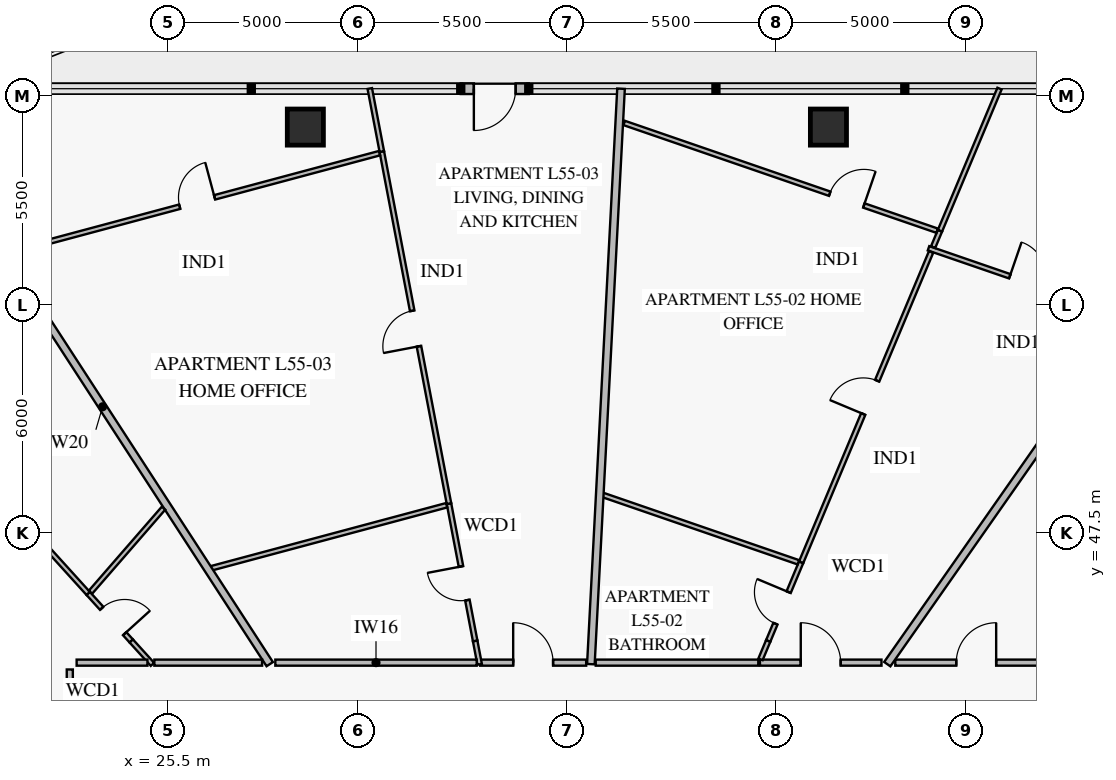
"""IFC4 building model, lengths in metres.
Left out: names, types, materials, properties, quantities, classifications, styles, units other than length and angle.
Written with IfcOpenShell. Run it as: python <this file> out.ifc"""

import sys

from ifc_helpers import new_model, si_unit, direction, frame, frame_2d, origin, origin_2d, place, context, subcontext, project, spatial, rectangle, extrude, element, fill, save


model = new_model("IFC4")
c1 = context("Model", 3, precision=1e-05, world=origin(), true_north=direction((0.0, 1.0)))
c2 = subcontext(c1, "Body", "Model", "MODEL_VIEW")
j1 = project(units=[si_unit("LENGTHUNIT", "METRE"), si_unit("PLANEANGLEUNIT", "RADIAN")], contexts=[c1])
p1 = place(None, origin())
s1 = spatial("IfcSite", under=j1, at=p1, CompositionType="ELEMENT")
p2 = place(p1, origin())
s2 = spatial("IfcBuilding", under=s1, at=p2, CompositionType="ELEMENT")
p3 = place(p2, frame((0.0, 0.0, 218.8)))
s3 = spatial("IfcBuildingStorey", under=s2, at=p3, CompositionType="ELEMENT", Elevation=218.8)
for number, where, z_axis, x_axis in (
    (1, (42.882, 58.173, 0.0), (0.0, 0.0, 1.0), (-1.0, 0.0, 0.0)),
    (2, (29.118, 58.173, 0.0), (0.0, 0.0, 1.0), (-1.0, 0.0, 0.0)),
):
    element("IfcColumn", number, at=place(p3, frame(where, z_axis=z_axis, x_axis=x_axis)), inside=s3, PredefinedType="COLUMN", context=c2, shape_type="SweptSolid", body=[
        extrude(rectangle(XDim=0.95, YDim=0.95, at=origin_2d()), origin(), (0.0, 0.0, 1.0), 3.55),
    ])
p4 = place(p3, frame((33.207, 59.183, 0.0), z_axis=(0.0, 0.0, 1.0), x_axis=(1.0, 0.0, 0.0)))
e3 = element("IfcWall", 3, at=p4, inside=s3, PredefinedType="SOLIDWALL", context=c2, shape_type="SweptSolid", body=[
    extrude(rectangle(XDim=1.79, YDim=0.28, at=frame_2d((0.895, 0.0))), origin(), (0.0, 0.0, 1.0), 3.55),
])
p5 = place(p4, frame((0.345, 0.0, 0.0)))
e4 = element("IfcOpeningElement", 4, at=p5, cuts=e3, PredefinedType="OPENING", context=c2, shape_type="SweptSolid", body=[
    extrude(rectangle(XDim=1.1, YDim=2.2, at=frame_2d((0.55, 1.1))), frame((0.0, 0.152, 0.0), z_axis=(0.0, -1.0, 0.0), x_axis=(1.0, 0.0, 0.0)), (0.0, 0.0, 1.0), 0.304),
])
p6 = place(p3, frame((48.9, 44.08, 0.0), z_axis=(0.0, 0.0, 1.0), x_axis=(-1.0, 0.0, 0.0)))
e5 = element("IfcWall", 5, at=p6, inside=s3, PredefinedType="PARTITIONING", context=c2, shape_type="SweptSolid", body=[
    extrude(rectangle(XDim=4.259, YDim=0.16, at=frame_2d((2.129, 0.0))), origin(), (0.0, 0.0, 1.0), 2.9),
])
p7 = place(p6, frame((1.604, 0.0, 0.0)))
e6 = element("IfcOpeningElement", 6, at=p7, cuts=e5, PredefinedType="OPENING", context=c2, shape_type="SweptSolid", body=[
    extrude(rectangle(XDim=1.05, YDim=2.15, at=frame_2d((0.525, 1.075))), frame((0.0, 0.092, 0.0), z_axis=(0.0, -1.0, 0.0), x_axis=(1.0, 0.0, 0.0)), (0.0, 0.0, 1.0), 0.184),
])
p8 = place(p3, frame((50.692, 53.201, 0.0), z_axis=(0.0, 0.0, 1.0), x_axis=(-0.945511260009, 0.325589399698, 0.0)))
e7 = element("IfcWall", 7, at=p8, inside=s3, PredefinedType="PARTITIONING", context=c2, shape_type="SweptSolid", body=[
    extrude(rectangle(XDim=5.475, YDim=0.12, at=frame_2d((2.738, 0.0))), origin(), (0.0, 0.0, 1.0), 3.55),
])
p9 = place(p8, frame((2.263, 0.0, 0.0)))
e8 = element("IfcOpeningElement", 8, at=p9, cuts=e7, PredefinedType="OPENING", context=c2, shape_type="SweptSolid", body=[
    extrude(rectangle(XDim=0.95, YDim=2.1, at=frame_2d((0.475, 1.05))), frame((0.0, 0.072, 0.0), z_axis=(0.0, -1.0, 0.0), x_axis=(1.0, 0.0, 0.0)), (0.0, 0.0, 1.0), 0.144),
])
p10 = place(p3, frame((41.297, 44.65, 0.0), z_axis=(0.0, 0.0, 1.0), x_axis=(0.386243492927, 0.922396858284, 0.0)))
e9 = element("IfcWall", 9, at=p10, inside=s3, PredefinedType="PARTITIONING", context=c2, shape_type="SweptSolid", body=[
    extrude(rectangle(XDim=2.246, YDim=0.12, at=frame_2d((1.123, 0.0))), origin(), (0.0, 0.0, 1.0), 3.55),
])
p11 = place(p10, frame((0.493, 0.0, 0.0)))
e10 = element("IfcOpeningElement", 10, at=p11, cuts=e9, PredefinedType="OPENING", context=c2, shape_type="SweptSolid", body=[
    extrude(rectangle(XDim=0.9, YDim=2.1, at=frame_2d((0.45, 1.05))), frame((0.0, 0.072, 0.0), z_axis=(0.0, -1.0, 0.0), x_axis=(1.0, 0.0, 0.0)), (0.0, 0.0, 1.0), 0.144),
])
p12 = place(p3, frame((42.164, 46.721, 0.0), z_axis=(0.0, 0.0, 1.0), x_axis=(0.386200840547, 0.922414717337, 0.0)))
e11 = element("IfcWall", 11, at=p12, inside=s3, PredefinedType="PARTITIONING", context=c2, shape_type="SweptSolid", body=[
    extrude(rectangle(XDim=8.854, YDim=0.12, at=frame_2d((4.427, 0.0))), origin(), (0.0, 0.0, 1.0), 3.55),
])
p13 = place(p12, frame((4.229, 0.0, 0.0)))
e12 = element("IfcOpeningElement", 12, at=p13, cuts=e11, PredefinedType="OPENING", context=c2, shape_type="SweptSolid", body=[
    extrude(rectangle(XDim=0.95, YDim=2.1, at=frame_2d((0.475, 1.05))), frame((0.0, 0.072, 0.0), z_axis=(0.0, -1.0, 0.0), x_axis=(1.0, 0.0, 0.0)), (0.0, 0.0, 1.0), 0.144),
])
p14 = place(p3, frame((45.636, 55.014, 0.0), z_axis=(0.0, 0.0, 1.0), x_axis=(0.38631298857, 0.922367754674, 0.0)))
e13 = element("IfcWall", 13, at=p14, inside=s3, PredefinedType="PARTITIONING", context=c2, shape_type="SweptSolid", body=[
    extrude(rectangle(XDim=0.469, YDim=0.12, at=frame_2d((0.235, 0.0))), origin(), (0.0, 0.0, 1.0), 3.55),
])
p15 = place(p3, frame((45.743, 55.446, 0.0), z_axis=(0.0, 0.0, 1.0), x_axis=(-0.945509015954, 0.325595916358, 0.0)))
e14 = element("IfcWall", 14, at=p15, inside=s3, PredefinedType="PARTITIONING", context=c2, shape_type="SweptSolid", body=[
    extrude(rectangle(XDim=8.711, YDim=0.12, at=frame_2d((4.355, 0.0))), origin(), (0.0, 0.0, 1.0), 2.87),
])
p16 = place(p15, frame((2.04, 0.0, 0.0)))
e15 = element("IfcOpeningElement", 15, at=p16, cuts=e14, PredefinedType="OPENING", context=c2, shape_type="SweptSolid", body=[
    extrude(rectangle(XDim=0.95, YDim=2.1, at=frame_2d((0.475, 1.05))), frame((0.0, 0.072, 0.0), z_axis=(0.0, -1.0, 0.0), x_axis=(1.0, 0.0, 0.0)), (0.0, 0.0, 1.0), 0.144),
])
p17 = place(p3, frame((44.278, 44.08, 0.0), z_axis=(0.0, 0.0, 1.0), x_axis=(-1.0, 0.0, 0.0)))
e16 = element("IfcWall", 16, at=p17, inside=s3, PredefinedType="PARTITIONING", context=c2, shape_type="SweptSolid", body=[
    extrude(rectangle(XDim=3.198, YDim=0.16, at=frame_2d((1.599, 0.0))), origin(), (0.0, 0.0, 1.0), 3.55),
])
p18 = place(p17, frame((1.074, 0.0, 0.0)))
e17 = element("IfcOpeningElement", 17, at=p18, cuts=e16, PredefinedType="OPENING", context=c2, shape_type="SweptSolid", body=[
    extrude(rectangle(XDim=1.05, YDim=2.15, at=frame_2d((0.525, 1.075))), frame((0.0, 0.092, 0.0), z_axis=(0.0, -1.0, 0.0), x_axis=(1.0, 0.0, 0.0)), (0.0, 0.0, 1.0), 0.184),
])
p19 = place(p3, frame((33.587, 44.65, 0.0), z_axis=(0.0, 0.0, 1.0), x_axis=(-0.187380416109, 0.982287422122, 0.0)))
e18 = element("IfcWall", 18, at=p19, inside=s3, PredefinedType="PARTITIONING", context=c2, shape_type="SweptSolid", body=[
    extrude(rectangle(XDim=3.679, YDim=0.12, at=frame_2d((1.84, 0.0))), origin(), (0.0, 0.0, 1.0), 3.55),
])
p20 = place(p19, frame((1.095, 0.0, 0.0)))
e19 = element("IfcOpeningElement", 19, at=p20, cuts=e18, PredefinedType="OPENING", context=c2, shape_type="SweptSolid", body=[
    extrude(rectangle(XDim=0.9, YDim=2.1, at=frame_2d((0.45, 1.05))), frame((0.0, 0.072, 0.0), z_axis=(0.0, -1.0, 0.0), x_axis=(1.0, 0.0, 0.0)), (0.0, 0.0, 1.0), 0.144),
])
p21 = place(p3, frame((32.897, 48.264, 0.0), z_axis=(0.0, 0.0, 1.0), x_axis=(-0.187382109983, 0.982287098998, 0.0)))
e20 = element("IfcWall", 20, at=p21, inside=s3, PredefinedType="PARTITIONING", context=c2, shape_type="SweptSolid", body=[
    extrude(rectangle(XDim=9.432, YDim=0.12, at=frame_2d((4.716, 0.0))), origin(), (0.0, 0.0, 1.0), 3.15),
])
p22 = place(p21, frame((4.216, 0.0, 0.0)))
e21 = element("IfcOpeningElement", 21, at=p22, cuts=e20, PredefinedType="OPENING", context=c2, shape_type="SweptSolid", body=[
    extrude(rectangle(XDim=0.95, YDim=2.1, at=frame_2d((0.475, 1.05))), frame((0.0, 0.072, 0.0), z_axis=(0.0, -1.0, 0.0), x_axis=(1.0, 0.0, 0.0)), (0.0, 0.0, 1.0), 0.144),
])
p23 = place(p3, frame((31.069, 57.487, 0.0), z_axis=(0.0, 0.0, 1.0), x_axis=(-0.965920975917, -0.258837146257, 0.0)))
e22 = element("IfcWall", 22, at=p23, inside=s3, PredefinedType="PARTITIONING", context=c2, shape_type="SweptSolid", body=[
    extrude(rectangle(XDim=10.103, YDim=0.12, at=frame_2d((5.051, 0.0))), origin(), (0.0, 0.0, 1.0), 2.87),
])
p24 = place(p23, frame((4.492, 0.0, 0.0)))
e23 = element("IfcOpeningElement", 23, at=p24, cuts=e22, PredefinedType="OPENING", context=c2, shape_type="SweptSolid", body=[
    extrude(rectangle(XDim=0.95, YDim=2.1, at=frame_2d((0.475, 1.05))), frame((0.0, 0.072, 0.0), z_axis=(0.0, -1.0, 0.0), x_axis=(1.0, 0.0, 0.0)), (0.0, 0.0, 1.0), 0.144),
])
p25 = place(p3, frame((36.507, 44.08, 0.0), z_axis=(0.0, 0.0, 1.0), x_axis=(-1.0, 0.0, 0.0)))
e24 = element("IfcWall", 24, at=p25, inside=s3, PredefinedType="PARTITIONING", context=c2, shape_type="SweptSolid", body=[
    extrude(rectangle(XDim=2.791, YDim=0.16, at=frame_2d((1.396, 0.0))), origin(), (0.0, 0.0, 1.0), 3.55),
])
p26 = place(p25, frame((0.871, 0.0, 0.0)))
e25 = element("IfcOpeningElement", 25, at=p26, cuts=e24, PredefinedType="OPENING", context=c2, shape_type="SweptSolid", body=[
    extrude(rectangle(XDim=1.05, YDim=2.15, at=frame_2d((0.525, 1.075))), frame((0.0, 0.092, 0.0), z_axis=(0.0, -1.0, 0.0), x_axis=(1.0, 0.0, 0.0)), (0.0, 0.0, 1.0), 0.184),
])
p27 = place(p3, frame((24.538, 44.65, 0.0), z_axis=(0.0, 0.0, 1.0), x_axis=(-0.671412772052, 0.741083591456, 0.0)))
e26 = element("IfcWall", 26, at=p27, inside=s3, PredefinedType="PARTITIONING", context=c2, shape_type="SweptSolid", body=[
    extrude(rectangle(XDim=1.689, YDim=0.12, at=frame_2d((0.844, 0.0))), origin(), (0.0, 0.0, 1.0), 3.55),
])
p28 = place(p27, frame((0.26, 0.0, 0.0)))
e27 = element("IfcOpeningElement", 27, at=p28, cuts=e26, PredefinedType="OPENING", context=c2, shape_type="SweptSolid", body=[
    extrude(rectangle(XDim=0.9, YDim=2.1, at=frame_2d((0.45, 1.05))), frame((0.0, 0.072, 0.0), z_axis=(0.0, -1.0, 0.0), x_axis=(1.0, 0.0, 0.0)), (0.0, 0.0, 1.0), 0.144),
])
p29 = place(p3, frame((23.404, 45.902, 0.0), z_axis=(0.0, 0.0, 1.0), x_axis=(-0.671451143828, 0.741048825282, 0.0)))
e28 = element("IfcWall", 28, at=p29, inside=s3, PredefinedType="PARTITIONING", context=c2, shape_type="SweptSolid", body=[
    extrude(rectangle(XDim=3.006, YDim=0.12, at=frame_2d((1.503, 0.0))), origin(), (0.0, 0.0, 1.0), 3.55),
])
p30 = place(p3, frame((22.92, 43.9, 0.0), z_axis=(0.0, 0.0, 1.0), x_axis=(0.0, -1.0, 0.0)))
e29 = element("IfcWall", 29, at=p30, inside=s3, PredefinedType="PARTITIONING", context=c2, shape_type="SweptSolid", body=[
    extrude(rectangle(XDim=5.639, YDim=0.16, at=frame_2d((2.819, 0.0))), origin(), (0.0, 0.0, 1.0), 3.55),
])
p31 = place(p30, frame((2.294, 0.0, 0.0)))
e30 = element("IfcOpeningElement", 30, at=p31, cuts=e29, PredefinedType="OPENING", context=c2, shape_type="SweptSolid", body=[
    extrude(rectangle(XDim=1.05, YDim=2.15, at=frame_2d((0.525, 1.075))), frame((0.0, 0.092, 0.0), z_axis=(0.0, -1.0, 0.0), x_axis=(1.0, 0.0, 0.0)), (0.0, 0.0, 1.0), 0.184),
])
p32 = place(p3, frame((44.43, 44.04, 0.0), z_axis=(0.0, 0.0, 1.0), x_axis=(0.573576964884, 0.819151674206, 0.0)))
e31 = element("IfcWall", 31, at=p32, inside=s3, PredefinedType="PARTITIONING", context=c2, shape_type="SweptSolid", body=[
    extrude(rectangle(XDim=15.295, YDim=0.2, at=frame_2d((7.647, 0.0))), origin(), (0.0, 0.0, 1.0), 2.87),
])
p33 = place(p3, frame((41.095, 44.168, 0.0), z_axis=(0.0, 0.0, 1.0), x_axis=(0.38640620175, 0.922328708893, 0.0)))
e32 = element("IfcWall", 32, at=p33, inside=s3, PredefinedType="PARTITIONING", context=c2, shape_type="SweptSolid", body=[
    extrude(rectangle(XDim=0.522, YDim=0.12, at=frame_2d((0.261, 0.0))), origin(), (0.0, 0.0, 1.0), 3.55),
])
p34 = place(p3, frame((45.818, 55.447, 0.0), z_axis=(0.0, 0.0, 1.0), x_axis=(0.386222700776, 0.922405564492, 0.0)))
e33 = element("IfcWall", 33, at=p34, inside=s3, PredefinedType="PARTITIONING", context=c2, shape_type="SweptSolid", body=[
    extrude(rectangle(XDim=4.054, YDim=0.12, at=frame_2d((2.027, 0.0))), origin(), (0.0, 0.0, 1.0), 2.87),
])
p35 = place(p3, frame((42.09, 46.721, 0.0), z_axis=(0.0, 0.0, 1.0), x_axis=(-0.945518250286, 0.325569099234, 0.0)))
e34 = element("IfcWall", 34, at=p35, inside=s3, PredefinedType="PARTITIONING", context=c2, shape_type="SweptSolid", body=[
    extrude(rectangle(XDim=5.479, YDim=0.12, at=frame_2d((2.74, 0.0))), origin(), (0.0, 0.0, 1.0), 2.9),
])
p36 = place(p3, frame((36.631, 44.04, 0.0), z_axis=(0.0, 0.0, 1.0), x_axis=(0.052325601384, 0.998630077376, 0.0)))
e35 = element("IfcWall", 35, at=p36, inside=s3, PredefinedType="PARTITIONING", context=c2, shape_type="SweptSolid", body=[
    extrude(rectangle(XDim=15.164, YDim=0.2, at=frame_2d((7.582, 0.0))), origin(), (0.0, 0.0, 1.0), 2.87),
])
p37 = place(p3, frame((33.704, 44.035, 0.0), z_axis=(0.0, 0.0, 1.0), x_axis=(-0.187327304351, 0.982297552193, 0.0)))
e36 = element("IfcWall", 36, at=p37, inside=s3, PredefinedType="PARTITIONING", context=c2, shape_type="SweptSolid", body=[
    extrude(rectangle(XDim=0.625, YDim=0.12, at=frame_2d((0.313, 0.0))), origin(), (0.0, 0.0, 1.0), 3.55),
])
p38 = place(p3, frame((31.13, 57.529, 0.0), z_axis=(0.0, 0.0, 1.0), x_axis=(-0.187324644642, 0.982298059404, 0.0)))
e37 = element("IfcWall", 37, at=p38, inside=s3, PredefinedType="PARTITIONING", context=c2, shape_type="SweptSolid", body=[
    extrude(rectangle(XDim=1.689, YDim=0.12, at=frame_2d((0.844, 0.0))), origin(), (0.0, 0.0, 1.0), 2.87),
])
p39 = place(p3, frame((32.836, 48.222, 0.0), z_axis=(0.0, 0.0, 1.0), x_axis=(-0.96593063868, -0.258801084347, 0.0)))
e38 = element("IfcWall", 38, at=p39, inside=s3, PredefinedType="PARTITIONING", context=c2, shape_type="SweptSolid", body=[
    extrude(rectangle(XDim=6.446, YDim=0.12, at=frame_2d((3.223, 0.0))), origin(), (0.0, 0.0, 1.0), 2.9),
])
p40 = place(p3, frame((28.181, 44.04, 0.0), z_axis=(0.0, 0.0, 1.0), x_axis=(-0.54463871909, 0.838670773109, 0.0)))
e39 = element("IfcWall", 39, at=p40, inside=s3, PredefinedType="PARTITIONING", context=c2, shape_type="SweptSolid", body=[
    extrude(rectangle(XDim=16.152, YDim=0.2, at=frame_2d((8.076, 0.0))), origin(), (0.0, 0.0, 1.0), 2.87),
])
p41 = place(p3, frame((25.095, 44.035, 0.0), z_axis=(0.0, 0.0, 1.0), x_axis=(-0.671544659746, 0.740964081428, 0.0)))
e40 = element("IfcWall", 40, at=p41, inside=s3, PredefinedType="PARTITIONING", context=c2, shape_type="SweptSolid", body=[
    extrude(rectangle(XDim=0.83, YDim=0.12, at=frame_2d((0.415, 0.0))), origin(), (0.0, 0.0, 1.0), 3.55),
])
p42 = place(p3, frame((25.387, 48.145, 0.0), z_axis=(0.0, 0.0, 1.0), x_axis=(-0.656075513179, -0.75469525042, 0.0)))
e41 = element("IfcWall", 41, at=p42, inside=s3, PredefinedType="PARTITIONING", context=c2, shape_type="SweptSolid", body=[
    extrude(rectangle(XDim=2.929, YDim=0.12, at=frame_2d((1.464, 0.0))), origin(), (0.0, 0.0, 1.0), 3.55),
])
p43 = place(p3, frame((22.96, 38.081, 0.0), z_axis=(0.0, 0.0, 1.0), x_axis=(-0.906312686975, 0.422607753629, 0.0)))
e42 = element("IfcWall", 42, at=p43, inside=s3, PredefinedType="PARTITIONING", context=c2, shape_type="SweptSolid", body=[
    extrude(rectangle(XDim=12.899, YDim=0.2, at=frame_2d((6.449, 0.0))), origin(), (0.0, 0.0, 1.0), 2.87),
])
p44 = place(p3, frame((41.036, 44.08, 0.0), z_axis=(0.0, 0.0, 1.0), x_axis=(-1.0, 0.0, 0.0)))
e43 = element("IfcWall", 43, at=p44, inside=s3, PredefinedType="PARTITIONING", context=c2, shape_type="SweptSolid", body=[
    extrude(rectangle(XDim=4.278, YDim=0.16, at=frame_2d((2.139, 0.0))), origin(), (0.0, 0.0, 1.0), 2.9),
])
p45 = place(p3, frame((33.626, 44.08, 0.0), z_axis=(0.0, 0.0, 1.0), x_axis=(-1.0, 0.0, 0.0)))
e44 = element("IfcWall", 44, at=p45, inside=s3, PredefinedType="PARTITIONING", context=c2, shape_type="SweptSolid", body=[
    extrude(rectangle(XDim=5.299, YDim=0.16, at=frame_2d((2.649, 0.0))), origin(), (0.0, 0.0, 1.0), 2.9),
])
p46 = place(p3, frame((24.962, 44.08, 0.0), z_axis=(0.0, 0.0, 1.0), x_axis=(-1.0, 0.0, 0.0)))
e45 = element("IfcWall", 45, at=p46, inside=s3, PredefinedType="PARTITIONING", context=c2, shape_type="SweptSolid", body=[
    extrude(rectangle(XDim=1.862, YDim=0.16, at=frame_2d((0.931, 0.0))), origin(), (0.0, 0.0, 1.0), 2.9),
])
p47 = place(p3, frame((27.98, 44.08, 0.0), z_axis=(0.0, 0.0, 1.0), x_axis=(-1.0, 0.0, 0.0)))
e46 = element("IfcWall", 46, at=p47, inside=s3, PredefinedType="PARTITIONING", context=c2, shape_type="SweptSolid", body=[
    extrude(rectangle(XDim=2.836, YDim=0.16, at=frame_2d((1.418, 0.0))), origin(), (0.0, 0.0, 1.0), 3.55),
])
p48 = place(p5, frame((1.1, 0.0, 0.0), z_axis=(0.0, 0.0, 1.0), x_axis=(-1.0, 0.0, 0.0)))
e47 = element("IfcDoor", 47, at=p48, inside=s3, OperationType="SINGLE_SWING_RIGHT", PredefinedType="DOOR", context=c2, shape_type="SweptSolid", body=[
    extrude(rectangle(XDim=1.1, YDim=2.2, at=frame_2d((0.55, 1.1))), frame((0.0, 0.025, 0.0), z_axis=(0.0, -1.0, 0.0), x_axis=(1.0, 0.0, 0.0)), (0.0, 0.0, 1.0), 0.05),
])
fill(e4, e47)
p49 = place(p7, frame((1.05, 0.0, 0.0), z_axis=(0.0, 0.0, 1.0), x_axis=(-1.0, 0.0, 0.0)))
e48 = element("IfcDoor", 48, at=p49, inside=s3, OperationType="SINGLE_SWING_RIGHT", PredefinedType="DOOR", context=c2, shape_type="SweptSolid", body=[
    extrude(rectangle(XDim=1.05, YDim=2.15, at=frame_2d((0.525, 1.075))), frame((0.0, 0.025, 0.0), z_axis=(0.0, -1.0, 0.0), x_axis=(1.0, 0.0, 0.0)), (0.0, 0.0, 1.0), 0.05),
])
fill(e6, e48)
p50 = place(p9, frame((0.95, 0.0, 0.0), z_axis=(0.0, 0.0, 1.0), x_axis=(-1.0, 0.0, 0.0)))
e49 = element("IfcDoor", 49, at=p50, inside=s3, OperationType="SINGLE_SWING_LEFT", PredefinedType="DOOR", context=c2, shape_type="SweptSolid", body=[
    extrude(rectangle(XDim=0.95, YDim=2.1, at=frame_2d((0.475, 1.05))), frame((0.0, 0.025, 0.0), z_axis=(0.0, -1.0, 0.0), x_axis=(1.0, 0.0, 0.0)), (0.0, 0.0, 1.0), 0.05),
])
fill(e8, e49)
p51 = place(p11, origin())
e50 = element("IfcDoor", 50, at=p51, inside=s3, OperationType="SINGLE_SWING_RIGHT", PredefinedType="DOOR", context=c2, shape_type="SweptSolid", body=[
    extrude(rectangle(XDim=0.9, YDim=2.1, at=frame_2d((0.45, 1.05))), frame((0.0, 0.025, 0.0), z_axis=(0.0, -1.0, 0.0), x_axis=(1.0, 0.0, 0.0)), (0.0, 0.0, 1.0), 0.05),
])
fill(e10, e50)
p52 = place(p13, origin())
e51 = element("IfcDoor", 51, at=p52, inside=s3, OperationType="SINGLE_SWING_LEFT", PredefinedType="DOOR", context=c2, shape_type="SweptSolid", body=[
    extrude(rectangle(XDim=0.95, YDim=2.1, at=frame_2d((0.475, 1.05))), frame((0.0, 0.025, 0.0), z_axis=(0.0, -1.0, 0.0), x_axis=(1.0, 0.0, 0.0)), (0.0, 0.0, 1.0), 0.05),
])
fill(e12, e51)
p53 = place(p16, frame((0.95, 0.0, 0.0), z_axis=(0.0, 0.0, 1.0), x_axis=(-1.0, 0.0, 0.0)))
e52 = element("IfcDoor", 52, at=p53, inside=s3, OperationType="SINGLE_SWING_RIGHT", PredefinedType="DOOR", context=c2, shape_type="SweptSolid", body=[
    extrude(rectangle(XDim=0.95, YDim=2.1, at=frame_2d((0.475, 1.05))), frame((0.0, 0.025, 0.0), z_axis=(0.0, -1.0, 0.0), x_axis=(1.0, 0.0, 0.0)), (0.0, 0.0, 1.0), 0.05),
])
fill(e15, e52)
p54 = place(p18, frame((1.05, 0.0, 0.0), z_axis=(0.0, 0.0, 1.0), x_axis=(-1.0, 0.0, 0.0)))
e53 = element("IfcDoor", 53, at=p54, inside=s3, OperationType="SINGLE_SWING_LEFT", PredefinedType="DOOR", context=c2, shape_type="SweptSolid", body=[
    extrude(rectangle(XDim=1.05, YDim=2.15, at=frame_2d((0.525, 1.075))), frame((0.0, 0.025, 0.0), z_axis=(0.0, -1.0, 0.0), x_axis=(1.0, 0.0, 0.0)), (0.0, 0.0, 1.0), 0.05),
])
fill(e17, e53)
p55 = place(p20, origin())
e54 = element("IfcDoor", 54, at=p55, inside=s3, OperationType="SINGLE_SWING_RIGHT", PredefinedType="DOOR", context=c2, shape_type="SweptSolid", body=[
    extrude(rectangle(XDim=0.9, YDim=2.1, at=frame_2d((0.45, 1.05))), frame((0.0, 0.025, 0.0), z_axis=(0.0, -1.0, 0.0), x_axis=(1.0, 0.0, 0.0)), (0.0, 0.0, 1.0), 0.05),
])
fill(e19, e54)
p56 = place(p22, origin())
e55 = element("IfcDoor", 55, at=p56, inside=s3, OperationType="SINGLE_SWING_LEFT", PredefinedType="DOOR", context=c2, shape_type="SweptSolid", body=[
    extrude(rectangle(XDim=0.95, YDim=2.1, at=frame_2d((0.475, 1.05))), frame((0.0, 0.025, 0.0), z_axis=(0.0, -1.0, 0.0), x_axis=(1.0, 0.0, 0.0)), (0.0, 0.0, 1.0), 0.05),
])
fill(e21, e55)
p57 = place(p24, frame((0.95, 0.0, 0.0), z_axis=(0.0, 0.0, 1.0), x_axis=(-1.0, 0.0, 0.0)))
e56 = element("IfcDoor", 56, at=p57, inside=s3, OperationType="SINGLE_SWING_RIGHT", PredefinedType="DOOR", context=c2, shape_type="SweptSolid", body=[
    extrude(rectangle(XDim=0.95, YDim=2.1, at=frame_2d((0.475, 1.05))), frame((0.0, 0.025, 0.0), z_axis=(0.0, -1.0, 0.0), x_axis=(1.0, 0.0, 0.0)), (0.0, 0.0, 1.0), 0.05),
])
fill(e23, e56)
p58 = place(p26, frame((1.05, 0.0, 0.0), z_axis=(0.0, 0.0, 1.0), x_axis=(-1.0, 0.0, 0.0)))
e57 = element("IfcDoor", 57, at=p58, inside=s3, OperationType="SINGLE_SWING_LEFT", PredefinedType="DOOR", context=c2, shape_type="SweptSolid", body=[
    extrude(rectangle(XDim=1.05, YDim=2.15, at=frame_2d((0.525, 1.075))), frame((0.0, 0.025, 0.0), z_axis=(0.0, -1.0, 0.0), x_axis=(1.0, 0.0, 0.0)), (0.0, 0.0, 1.0), 0.05),
])
fill(e25, e57)
p59 = place(p28, frame((0.9, 0.0, 0.0), z_axis=(0.0, 0.0, 1.0), x_axis=(-1.0, 0.0, 0.0)))
e58 = element("IfcDoor", 58, at=p59, inside=s3, OperationType="SINGLE_SWING_RIGHT", PredefinedType="DOOR", context=c2, shape_type="SweptSolid", body=[
    extrude(rectangle(XDim=0.9, YDim=2.1, at=frame_2d((0.45, 1.05))), frame((0.0, 0.025, 0.0), z_axis=(0.0, -1.0, 0.0), x_axis=(1.0, 0.0, 0.0)), (0.0, 0.0, 1.0), 0.05),
])
fill(e27, e58)
save(model, sys.argv[1])
